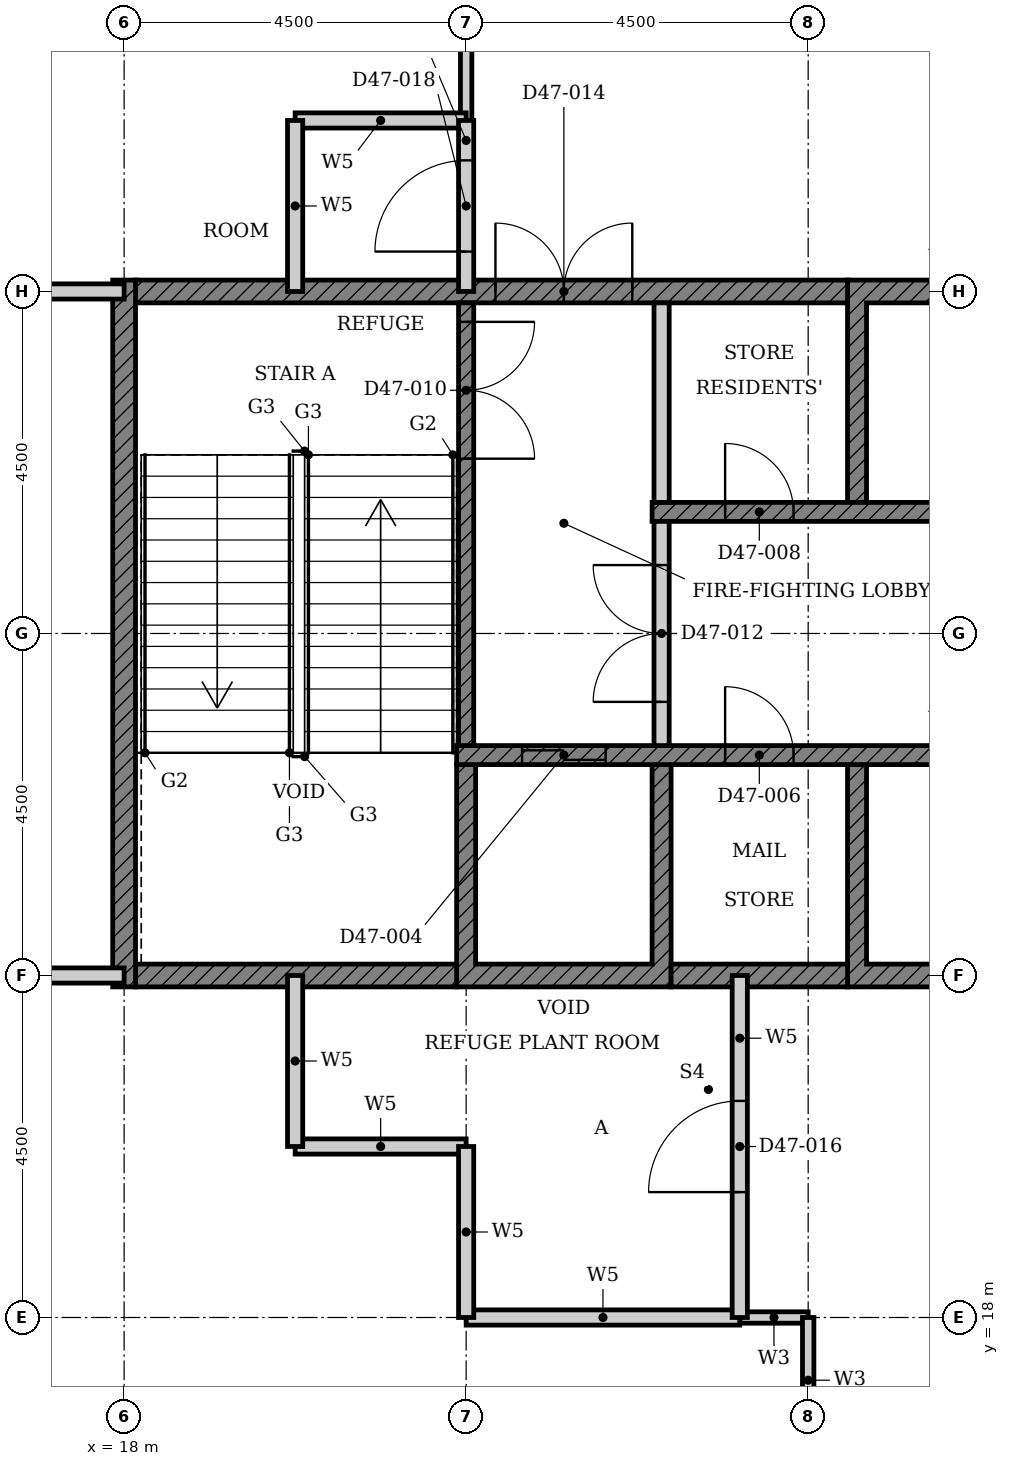
"""IFC4 building model, lengths in metres.
Left out: names, types, materials, properties, quantities, classifications, styles, units other than length and angle.
Written with IfcOpenShell. Run it as: python <this file> out.ifc"""

import sys

from ifc_helpers import new_model, si_unit, direction, frame, frame_2d, origin, place, context, subcontext, project, spatial, polyline, rectangle, outline, extrude, element, fill, save


model = new_model("IFC4")
c1 = context("Model", 3, precision=1e-05, world=origin(), true_north=direction((0.0, 1.0)))
c2 = subcontext(c1, "Body", "Model", "MODEL_VIEW")
j1 = project(units=[si_unit("LENGTHUNIT", "METRE"), si_unit("PLANEANGLEUNIT", "RADIAN")], contexts=[c1])
p1 = place(None, origin())
s1 = spatial("IfcSite", under=j1, at=p1, CompositionType="ELEMENT")
p2 = place(p1, origin())
s2 = spatial("IfcBuilding", under=s1, at=p2, CompositionType="ELEMENT")
p3 = place(p2, frame((0.0, 0.0, 187.6)))
s3 = spatial("IfcBuildingStorey", under=s2, at=p3, CompositionType="ELEMENT", Elevation=187.6)
p4 = place(p3, origin())
e1 = element("IfcWall", 1, at=p4, inside=s3, PredefinedType="SHEAR", context=c2, shape_type="SweptSolid", body=[
    extrude(outline(polyline([(22.375, 22.35), (25.197, 22.35), (25.197, 25.275), (24.947, 25.275), (24.947, 22.65), (22.625, 22.65), (22.625, 25.275), (22.375, 25.275), (22.375, 22.35)])), origin(), (0.0, 0.0, 1.0), 4.5),
])
p5 = place(p3, origin())
e2 = element("IfcWall", 2, at=p5, inside=s3, PredefinedType="SHEAR", context=c2, shape_type="SweptSolid", body=[
    extrude(outline(polyline([(27.518, 22.35), (32.911, 22.35), (32.911, 25.275), (32.661, 25.275), (32.661, 22.65), (30.339, 22.65), (30.339, 25.275), (30.089, 25.275), (30.089, 22.65), (27.768, 22.65), (27.768, 25.275), (27.518, 25.275), (27.518, 22.35)])), origin(), (0.0, 0.0, 1.0), 4.5),
])
p6 = place(p3, origin())
e3 = element("IfcWall", 3, at=p6, inside=s3, PredefinedType="SHEAR", context=c2, shape_type="SweptSolid", body=[
    extrude(outline(polyline([(27.518, 28.725), (27.768, 28.725), (27.768, 31.35), (30.089, 31.35), (30.089, 28.725), (30.339, 28.725), (30.339, 31.35), (32.661, 31.35), (32.661, 28.725), (32.911, 28.725), (32.911, 31.65), (27.518, 31.65), (27.518, 28.725)])), origin(), (0.0, 0.0, 1.0), 4.5),
])
p7 = place(p3, frame((18.15, 22.5, 0.0), z_axis=(0.0, 0.0, 1.0), x_axis=(1.0, 0.0, 0.0)))
e4 = element("IfcWall", 4, at=p7, inside=s3, PredefinedType="SHEAR", context=c2, shape_type="SweptSolid", body=[
    extrude(rectangle(XDim=4.225, YDim=0.3, at=frame_2d((2.113, 0.0))), origin(), (0.0, 0.0, 1.0), 4.5),
])
p8 = place(p3, frame((25.197, 22.5, 0.0), z_axis=(0.0, 0.0, 1.0), x_axis=(1.0, 0.0, 0.0)))
e5 = element("IfcWall", 5, at=p8, inside=s3, PredefinedType="SHEAR", context=c2, shape_type="SweptSolid", body=[
    extrude(rectangle(XDim=2.321, YDim=0.3, at=frame_2d((1.161, 0.0))), origin(), (0.0, 0.0, 1.0), 4.5),
])
p9 = place(p3, frame((18.15, 31.5, 0.0), z_axis=(0.0, 0.0, 1.0), x_axis=(1.0, 0.0, 0.0)))
e6 = element("IfcWall", 6, at=p9, inside=s3, PredefinedType="SHEAR", context=c2, shape_type="SweptSolid", body=[
    extrude(rectangle(XDim=9.368, YDim=0.3, at=frame_2d((4.684, 0.0))), origin(), (0.0, 0.0, 1.0), 4.5),
])
p10 = place(p9, frame((4.736, 0.0, 0.0)))
e7 = element("IfcOpeningElement", 7, at=p10, cuts=e6, PredefinedType="OPENING", context=c2, shape_type="SweptSolid", body=[
    extrude(rectangle(XDim=1.8, YDim=2.1, at=frame_2d((0.9, 1.05))), frame((0.0, 0.16, 0.0), z_axis=(0.0, -1.0, 0.0), x_axis=(1.0, 0.0, 0.0)), (0.0, 0.0, 1.0), 0.32),
])
p11 = place(p3, frame((18.0, 22.35, 0.0), z_axis=(0.0, 0.0, 1.0), x_axis=(0.0, 1.0, 0.0)))
e8 = element("IfcWall", 8, at=p11, inside=s3, PredefinedType="SHEAR", context=c2, shape_type="SweptSolid", body=[
    extrude(rectangle(XDim=9.3, YDim=0.3, at=frame_2d((4.65, 0.0))), origin(), (0.0, 0.0, 1.0), 4.5),
])
p12 = place(p3, frame((22.375, 25.4, 0.0), z_axis=(0.0, 0.0, 1.0), x_axis=(1.0, 0.0, 0.0)))
e9 = element("IfcWall", 9, at=p12, inside=s3, PredefinedType="SHEAR", context=c2, shape_type="SweptSolid", body=[
    extrude(rectangle(XDim=15.678, YDim=0.25, at=frame_2d((7.839, 0.0))), origin(), (0.0, 0.0, 1.0), 4.5),
])
p13 = place(p12, frame((8.575, 0.0, 0.0)))
e10 = element("IfcOpeningElement", 10, at=p13, cuts=e9, PredefinedType="OPENING", context=c2, shape_type="SweptSolid", body=[
    extrude(rectangle(XDim=1.1, YDim=2.1, at=frame_2d((0.55, 1.05))), frame((0.0, 0.135, 0.0), z_axis=(0.0, -1.0, 0.0), x_axis=(1.0, 0.0, 0.0)), (0.0, 0.0, 1.0), 0.27),
])
p14 = place(p12, frame((0.861, 0.0, 0.0)))
e11 = element("IfcOpeningElement", 11, at=p14, cuts=e9, PredefinedType="OPENING", context=c2, shape_type="SweptSolid", body=[
    extrude(rectangle(XDim=1.1, YDim=2.1, at=frame_2d((0.55, 1.05))), frame((0.0, 0.135, 0.0), z_axis=(0.0, -1.0, 0.0), x_axis=(1.0, 0.0, 0.0)), (0.0, 0.0, 1.0), 0.27),
])
p15 = place(p12, frame((3.532, 0.0, 0.0)))
e12 = element("IfcOpeningElement", 12, at=p15, cuts=e9, PredefinedType="OPENING", context=c2, shape_type="SweptSolid", body=[
    extrude(rectangle(XDim=0.9, YDim=2.1, at=frame_2d((0.45, 1.05))), frame((0.0, 0.135, 0.0), z_axis=(0.0, -1.0, 0.0), x_axis=(1.0, 0.0, 0.0)), (0.0, 0.0, 1.0), 0.27),
])
p16 = place(p12, frame((12.532, 0.0, 0.0)))
e13 = element("IfcOpeningElement", 13, at=p16, cuts=e9, PredefinedType="OPENING", context=c2, shape_type="SweptSolid", body=[
    extrude(rectangle(XDim=0.9, YDim=2.1, at=frame_2d((0.45, 1.05))), frame((0.0, 0.135, 0.0), z_axis=(0.0, -1.0, 0.0), x_axis=(1.0, 0.0, 0.0)), (0.0, 0.0, 1.0), 0.27),
])
p17 = place(p3, frame((24.947, 28.6, 0.0), z_axis=(0.0, 0.0, 1.0), x_axis=(1.0, 0.0, 0.0)))
e14 = element("IfcWall", 14, at=p17, inside=s3, PredefinedType="SHEAR", context=c2, shape_type="SweptSolid", body=[
    extrude(rectangle(XDim=15.678, YDim=0.25, at=frame_2d((7.839, 0.0))), origin(), (0.0, 0.0, 1.0), 4.5),
])
p18 = place(p17, frame((6.004, 0.0, 0.0)))
e15 = element("IfcOpeningElement", 15, at=p18, cuts=e14, PredefinedType="OPENING", context=c2, shape_type="SweptSolid", body=[
    extrude(rectangle(XDim=1.1, YDim=2.1, at=frame_2d((0.55, 1.05))), frame((0.0, 0.135, 0.0), z_axis=(0.0, -1.0, 0.0), x_axis=(1.0, 0.0, 0.0)), (0.0, 0.0, 1.0), 0.27),
])
p19 = place(p17, frame((11.146, 0.0, 0.0)))
e16 = element("IfcOpeningElement", 16, at=p19, cuts=e14, PredefinedType="OPENING", context=c2, shape_type="SweptSolid", body=[
    extrude(rectangle(XDim=1.1, YDim=2.1, at=frame_2d((0.55, 1.05))), frame((0.0, 0.135, 0.0), z_axis=(0.0, -1.0, 0.0), x_axis=(1.0, 0.0, 0.0)), (0.0, 0.0, 1.0), 0.27),
])
p20 = place(p17, frame((13.718, 0.0, 0.0)))
e17 = element("IfcOpeningElement", 17, at=p20, cuts=e14, PredefinedType="OPENING", context=c2, shape_type="SweptSolid", body=[
    extrude(rectangle(XDim=1.1, YDim=2.1, at=frame_2d((0.55, 1.05))), frame((0.0, 0.135, 0.0), z_axis=(0.0, -1.0, 0.0), x_axis=(1.0, 0.0, 0.0)), (0.0, 0.0, 1.0), 0.27),
])
p21 = place(p17, frame((0.961, 0.0, 0.0)))
e18 = element("IfcOpeningElement", 18, at=p21, cuts=e14, PredefinedType="OPENING", context=c2, shape_type="SweptSolid", body=[
    extrude(rectangle(XDim=0.9, YDim=2.1, at=frame_2d((0.45, 1.05))), frame((0.0, 0.135, 0.0), z_axis=(0.0, -1.0, 0.0), x_axis=(1.0, 0.0, 0.0)), (0.0, 0.0, 1.0), 0.27),
])
p22 = place(p17, frame((8.675, 0.0, 0.0)))
e19 = element("IfcOpeningElement", 19, at=p22, cuts=e14, PredefinedType="OPENING", context=c2, shape_type="SweptSolid", body=[
    extrude(rectangle(XDim=0.9, YDim=2.1, at=frame_2d((0.45, 1.05))), frame((0.0, 0.135, 0.0), z_axis=(0.0, -1.0, 0.0), x_axis=(1.0, 0.0, 0.0)), (0.0, 0.0, 1.0), 0.27),
])
p23 = place(p3, frame((25.072, 28.725, 0.0), z_axis=(0.0, 0.0, 1.0), x_axis=(0.0, 1.0, 0.0)))
e20 = element("IfcWall", 20, at=p23, inside=s3, PredefinedType="PARTITIONING", context=c2, shape_type="SweptSolid", body=[
    extrude(rectangle(XDim=2.625, YDim=0.2, at=frame_2d((1.312, 0.0))), origin(), (0.0, 0.0, 1.0), 4.5),
])
p24 = place(p3, frame((22.5, 31.35, 0.0), z_axis=(0.0, 0.0, 1.0), x_axis=(0.0, -1.0, 0.0)))
e21 = element("IfcWall", 21, at=p24, inside=s3, PredefinedType="SHEAR", context=c2, shape_type="SweptSolid", body=[
    extrude(rectangle(XDim=5.825, YDim=0.2, at=frame_2d((2.913, 0.0))), origin(), (0.0, 0.0, 1.0), 4.5),
])
p25 = place(p24, frame((0.25, 0.0, 0.0)))
e22 = element("IfcOpeningElement", 22, at=p25, cuts=e21, PredefinedType="OPENING", context=c2, shape_type="SweptSolid", body=[
    extrude(rectangle(XDim=1.8, YDim=2.1, at=frame_2d((0.9, 1.05))), frame((0.0, 0.11, 0.0), z_axis=(0.0, -1.0, 0.0), x_axis=(1.0, 0.0, 0.0)), (0.0, 0.0, 1.0), 0.22),
])
p26 = place(p3, frame((25.072, 25.525, 0.0), z_axis=(0.0, 0.0, 1.0), x_axis=(0.0, 1.0, 0.0)))
e23 = element("IfcWall", 23, at=p26, inside=s3, PredefinedType="PARTITIONING", context=c2, shape_type="SweptSolid", body=[
    extrude(rectangle(XDim=2.95, YDim=0.2, at=frame_2d((1.475, 0.0))), origin(), (0.0, 0.0, 1.0), 4.5),
])
p27 = place(p26, frame((0.575, 0.0, 0.0)))
e24 = element("IfcOpeningElement", 24, at=p27, cuts=e23, PredefinedType="OPENING", context=c2, shape_type="SweptSolid", body=[
    extrude(rectangle(XDim=1.8, YDim=2.1, at=frame_2d((0.9, 1.05))), frame((0.0, 0.11, 0.0), z_axis=(0.0, -1.0, 0.0), x_axis=(1.0, 0.0, 0.0)), (0.0, 0.0, 1.0), 0.22),
])
p28 = place(p3, frame((26.1, 18.0, 0.0), z_axis=(0.0, 0.0, 1.0), x_axis=(1.0, 0.0, 0.0)))
e25 = element("IfcWall", 25, at=p28, inside=s3, PredefinedType="PARTITIONING", context=c2, shape_type="SweptSolid", body=[
    extrude(rectangle(XDim=0.9, YDim=0.15, at=frame_2d((0.45, 0.0))), origin(), (0.0, 0.0, 1.0), 4.5),
])
p29 = place(p3, frame((22.5, 33.75, 0.0), z_axis=(0.0, 0.0, 1.0), x_axis=(0.0, 1.0, 0.0)))
e26 = element("IfcWall", 26, at=p29, inside=s3, PredefinedType="PARTITIONING", context=c2, shape_type="SweptSolid", body=[
    extrude(rectangle(XDim=2.25, YDim=0.15, at=frame_2d((1.125, 0.0))), origin(), (0.0, 0.0, 1.0), 4.5),
])
p30 = place(p3, frame((27.0, 13.5, 0.0), z_axis=(0.0, 0.0, 1.0), x_axis=(0.0, 1.0, 0.0)))
e27 = element("IfcWall", 27, at=p30, inside=s3, PredefinedType="PARTITIONING", context=c2, shape_type="SweptSolid", body=[
    extrude(rectangle(XDim=4.5, YDim=0.15, at=frame_2d((2.25, 0.0))), origin(), (0.0, 0.0, 1.0), 4.5),
])
p31 = place(p30, frame((1.65, 0.0, 0.0)))
e28 = element("IfcOpeningElement", 28, at=p31, cuts=e27, PredefinedType="OPENING", context=c2, shape_type="SweptSolid", body=[
    extrude(rectangle(XDim=1.2, YDim=2.1, at=frame_2d((0.6, 1.05))), frame((0.0, 0.085, 0.0), z_axis=(0.0, -1.0, 0.0), x_axis=(1.0, 0.0, 0.0)), (0.0, 0.0, 1.0), 0.17),
])
p32 = place(p3, frame((22.5, 18.0, 0.0), z_axis=(0.0, 0.0, 1.0), x_axis=(1.0, 0.0, 0.0)))
e29 = element("IfcWall", 29, at=p32, inside=s3, PredefinedType="PARTITIONING", context=c2, shape_type="SweptSolid", body=[
    extrude(rectangle(XDim=3.6, YDim=0.2, at=frame_2d((1.8, 0.0))), origin(), (0.0, 0.0, 1.0), 4.5),
])
p33 = place(p3, frame((20.25, 20.25, 0.0), z_axis=(0.0, 0.0, 1.0), x_axis=(1.0, 0.0, 0.0)))
e30 = element("IfcWall", 30, at=p33, inside=s3, PredefinedType="PARTITIONING", context=c2, shape_type="SweptSolid", body=[
    extrude(rectangle(XDim=2.25, YDim=0.2, at=frame_2d((1.125, 0.0))), origin(), (0.0, 0.0, 1.0), 4.5),
])
p34 = place(p3, frame((9.0, 22.5, 0.0), z_axis=(0.0, 0.0, 1.0), x_axis=(1.0, 0.0, 0.0)))
e31 = element("IfcWall", 31, at=p34, inside=s3, PredefinedType="PARTITIONING", context=c2, shape_type="SweptSolid", body=[
    extrude(rectangle(XDim=9.0, YDim=0.2, at=frame_2d((4.5, 0.0))), origin(), (0.0, 0.0, 1.0), 3.78),
])
p35 = place(p34, frame((3.9, 0.0, 0.0)))
e32 = element("IfcOpeningElement", 32, at=p35, cuts=e31, PredefinedType="OPENING", context=c2, shape_type="SweptSolid", body=[
    extrude(rectangle(XDim=1.2, YDim=2.1, at=frame_2d((0.6, 1.05))), frame((0.0, 0.11, 0.0), z_axis=(0.0, -1.0, 0.0), x_axis=(1.0, 0.0, 0.0)), (0.0, 0.0, 1.0), 0.22),
])
p36 = place(p3, frame((9.0, 31.5, 0.0), z_axis=(0.0, 0.0, 1.0), x_axis=(1.0, 0.0, 0.0)))
e33 = element("IfcWall", 33, at=p36, inside=s3, PredefinedType="PARTITIONING", context=c2, shape_type="SweptSolid", body=[
    extrude(rectangle(XDim=9.0, YDim=0.2, at=frame_2d((4.5, 0.0))), origin(), (0.0, 0.0, 1.0), 3.78),
])
for number, where, z_axis, x_axis in (
    (34, (20.25, 33.75, 0.0), (0.0, 0.0, 1.0), (1.0, 0.0, 0.0)),
    (35, (20.25, 20.25, 0.0), (0.0, 0.0, 1.0), (0.0, 1.0, 0.0)),
    (36, (20.25, 31.5, 0.0), (0.0, 0.0, 1.0), (0.0, 1.0, 0.0)),
    (37, (22.5, 18.0, 0.0), (0.0, 0.0, 1.0), (0.0, 1.0, 0.0)),
):
    element("IfcWall", number, at=place(p3, frame(where, z_axis=z_axis, x_axis=x_axis)), inside=s3, PredefinedType="PARTITIONING", context=c2, shape_type="SweptSolid", body=[
        extrude(rectangle(XDim=2.25, YDim=0.2, at=frame_2d((1.125, 0.0))), origin(), (0.0, 0.0, 1.0), 4.5),
    ])
p37 = place(p3, frame((22.5, 31.5, 0.0), z_axis=(0.0, 0.0, 1.0), x_axis=(0.0, 1.0, 0.0)))
e38 = element("IfcWall", 38, at=p37, inside=s3, PredefinedType="PARTITIONING", context=c2, shape_type="SweptSolid", body=[
    extrude(rectangle(XDim=2.25, YDim=0.2, at=frame_2d((1.125, 0.0))), origin(), (0.0, 0.0, 1.0), 4.5),
])
p38 = place(p37, frame((0.525, 0.0, 0.0)))
e39 = element("IfcOpeningElement", 39, at=p38, cuts=e38, PredefinedType="OPENING", context=c2, shape_type="SweptSolid", body=[
    extrude(rectangle(XDim=1.2, YDim=2.1, at=frame_2d((0.6, 1.05))), frame((0.0, 0.11, 0.0), z_axis=(0.0, -1.0, 0.0), x_axis=(1.0, 0.0, 0.0)), (0.0, 0.0, 1.0), 0.22),
])
p39 = place(p3, frame((26.1, 18.0, 0.0), z_axis=(0.0, 0.0, 1.0), x_axis=(0.0, 1.0, 0.0)))
e40 = element("IfcWall", 40, at=p39, inside=s3, PredefinedType="PARTITIONING", context=c2, shape_type="SweptSolid", body=[
    extrude(rectangle(XDim=4.5, YDim=0.2, at=frame_2d((2.25, 0.0))), origin(), (0.0, 0.0, 1.0), 4.5),
])
p40 = place(p39, frame((1.65, 0.0, 0.0)))
e41 = element("IfcOpeningElement", 41, at=p40, cuts=e40, PredefinedType="OPENING", context=c2, shape_type="SweptSolid", body=[
    extrude(rectangle(XDim=1.2, YDim=2.1, at=frame_2d((0.6, 1.05))), frame((0.0, 0.11, 0.0), z_axis=(0.0, -1.0, 0.0), x_axis=(1.0, 0.0, 0.0)), (0.0, 0.0, 1.0), 0.22),
])
p41 = place(p14, origin())
e42 = element("IfcDoor", 42, at=p41, inside=s3, OperationType="DOUBLE_DOOR_SLIDING", PredefinedType="DOOR", context=c2, shape_type="SweptSolid", body=[
    extrude(rectangle(XDim=1.1, YDim=2.1, at=frame_2d((0.55, 1.05))), frame((0.0, 0.025, 0.0), z_axis=(0.0, -1.0, 0.0), x_axis=(1.0, 0.0, 0.0)), (0.0, 0.0, 1.0), 0.05),
])
fill(e11, e42)
p42 = place(p15, origin())
e43 = element("IfcDoor", 43, at=p42, inside=s3, OperationType="SINGLE_SWING_LEFT", PredefinedType="DOOR", context=c2, shape_type="SweptSolid", body=[
    extrude(rectangle(XDim=0.9, YDim=2.1, at=frame_2d((0.45, 1.05))), frame((0.0, 0.025, 0.0), z_axis=(0.0, -1.0, 0.0), x_axis=(1.0, 0.0, 0.0)), (0.0, 0.0, 1.0), 0.05),
])
fill(e12, e43)
p43 = place(p21, origin())
e44 = element("IfcDoor", 44, at=p43, inside=s3, OperationType="SINGLE_SWING_LEFT", PredefinedType="DOOR", context=c2, shape_type="SweptSolid", body=[
    extrude(rectangle(XDim=0.9, YDim=2.1, at=frame_2d((0.45, 1.05))), frame((0.0, 0.025, 0.0), z_axis=(0.0, -1.0, 0.0), x_axis=(1.0, 0.0, 0.0)), (0.0, 0.0, 1.0), 0.05),
])
fill(e18, e44)
p44 = place(p25, origin())
e45 = element("IfcDoor", 45, at=p44, inside=s3, OperationType="DOUBLE_DOOR_SINGLE_SWING", PredefinedType="DOOR", context=c2, shape_type="SweptSolid", body=[
    extrude(rectangle(XDim=1.8, YDim=2.1, at=frame_2d((0.9, 1.05))), frame((0.0, 0.025, 0.0), z_axis=(0.0, -1.0, 0.0), x_axis=(1.0, 0.0, 0.0)), (0.0, 0.0, 1.0), 0.05),
])
fill(e22, e45)
p45 = place(p27, origin())
e46 = element("IfcDoor", 46, at=p45, inside=s3, OperationType="DOUBLE_DOOR_SINGLE_SWING", PredefinedType="DOOR", context=c2, shape_type="SweptSolid", body=[
    extrude(rectangle(XDim=1.8, YDim=2.1, at=frame_2d((0.9, 1.05))), frame((0.0, 0.025, 0.0), z_axis=(0.0, -1.0, 0.0), x_axis=(1.0, 0.0, 0.0)), (0.0, 0.0, 1.0), 0.05),
])
fill(e24, e46)
p46 = place(p10, origin())
e47 = element("IfcDoor", 47, at=p46, inside=s3, OperationType="DOUBLE_DOOR_SINGLE_SWING", PredefinedType="DOOR", context=c2, shape_type="SweptSolid", body=[
    extrude(rectangle(XDim=1.8, YDim=2.1, at=frame_2d((0.9, 1.05))), frame((0.0, 0.025, 0.0), z_axis=(0.0, -1.0, 0.0), x_axis=(1.0, 0.0, 0.0)), (0.0, 0.0, 1.0), 0.05),
])
fill(e7, e47)
p47 = place(p40, origin())
e48 = element("IfcDoor", 48, at=p47, inside=s3, OperationType="SINGLE_SWING_RIGHT", PredefinedType="DOOR", context=c2, shape_type="SweptSolid", body=[
    extrude(rectangle(XDim=1.2, YDim=2.1, at=frame_2d((0.6, 1.05))), frame((0.0, 0.025, 0.0), z_axis=(0.0, -1.0, 0.0), x_axis=(1.0, 0.0, 0.0)), (0.0, 0.0, 1.0), 0.05),
])
fill(e41, e48)
p48 = place(p38, origin())
e49 = element("IfcDoor", 49, at=p48, inside=s3, OperationType="SINGLE_SWING_RIGHT", PredefinedType="DOOR", context=c2, shape_type="SweptSolid", body=[
    extrude(rectangle(XDim=1.2, YDim=2.1, at=frame_2d((0.6, 1.05))), frame((0.0, 0.025, 0.0), z_axis=(0.0, -1.0, 0.0), x_axis=(1.0, 0.0, 0.0)), (0.0, 0.0, 1.0), 0.05),
])
fill(e39, e49)
save(model, sys.argv[1])
